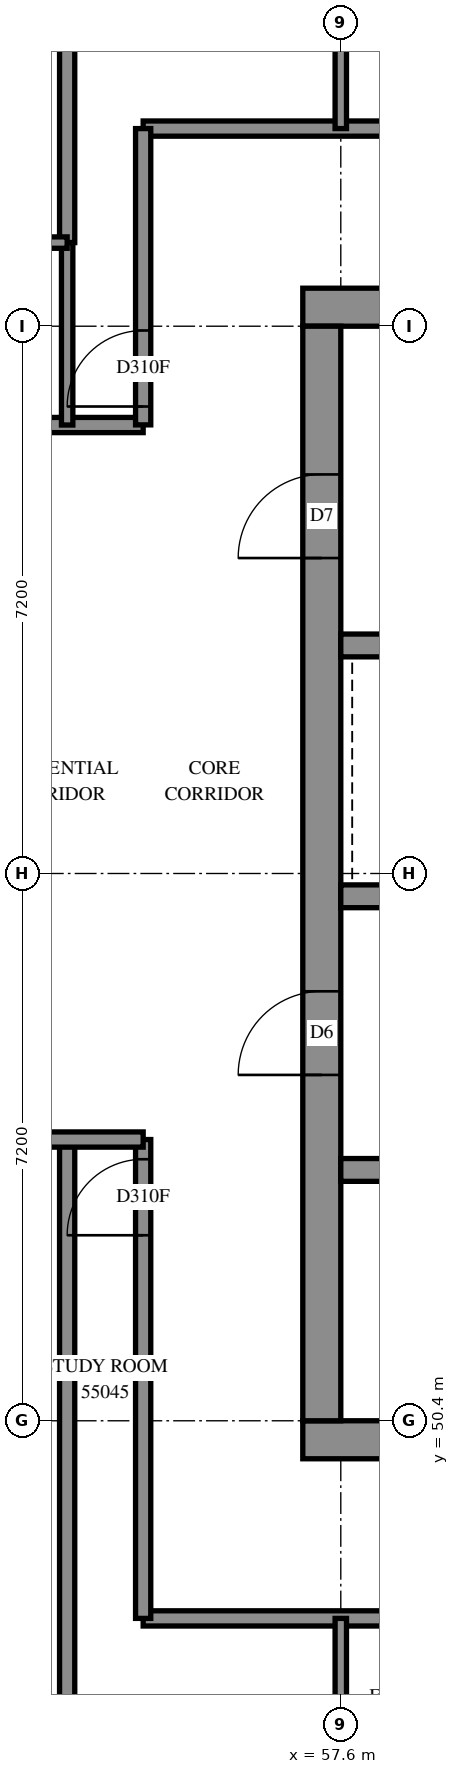
"""IFC4 building model, lengths in metres.
Left out: names, types, materials, properties, quantities, classifications, styles, units other than length and angle.
Written with IfcOpenShell. Run it as: python <this file> out.ifc"""

import sys

from ifc_helpers import new_model, si_unit, direction, frame, frame_2d, origin, place, context, subcontext, project, spatial, rectangle, extrude, element, fill, save


model = new_model("IFC4")
c1 = context("Model", 3, precision=1e-05, world=origin(), true_north=direction((0.0, 1.0)))
c2 = subcontext(c1, "Body", "Model", "MODEL_VIEW")
j1 = project(units=[si_unit("LENGTHUNIT", "METRE"), si_unit("PLANEANGLEUNIT", "RADIAN")], contexts=[c1])
p1 = place(None, origin())
s1 = spatial("IfcSite", under=j1, at=p1, CompositionType="ELEMENT")
p2 = place(p1, origin())
s2 = spatial("IfcBuilding", under=s1, at=p2, CompositionType="ELEMENT")
p3 = place(p2, frame((0.0, 0.0, 203.2)))
s3 = spatial("IfcBuildingStorey", under=s2, at=p3, CompositionType="ELEMENT", Elevation=203.2)
p4 = place(p3, frame((57.1, 50.15, -0.3), z_axis=(0.0, 0.0, 1.0), x_axis=(1.0, 0.0, 0.0)))
e1 = element("IfcWall", 1, at=p4, inside=s3, PredefinedType="SHEAR", context=c2, shape_type="SweptSolid", body=[
    extrude(rectangle(XDim=15.4, YDim=0.5, at=frame_2d((7.7, 0.0))), origin(), (0.0, 0.0, 1.0), 2.7),
])
p5 = place(p3, frame((57.1, 65.05, -0.3), z_axis=(0.0, 0.0, 1.0), x_axis=(1.0, 0.0, 0.0)))
e2 = element("IfcWall", 2, at=p5, inside=s3, PredefinedType="SHEAR", context=c2, shape_type="SweptSolid", body=[
    extrude(rectangle(XDim=15.4, YDim=0.5, at=frame_2d((7.7, 0.0))), origin(), (0.0, 0.0, 1.0), 2.7),
])
p6 = place(p5, frame((10.5, 0.0, 0.3)))
e3 = element("IfcOpeningElement", 3, at=p6, cuts=e2, PredefinedType="OPENING", context=c2, shape_type="SweptSolid", body=[
    extrude(rectangle(XDim=0.8, YDim=2.1, at=frame_2d((0.4, 1.05))), frame((0.0, 0.26, 0.0), z_axis=(0.0, -1.0, 0.0), x_axis=(1.0, 0.0, 0.0)), (0.0, 0.0, 1.0), 0.52),
])
p7 = place(p3, frame((57.35, 50.4, -0.3), z_axis=(0.0, 0.0, 1.0), x_axis=(0.0, 1.0, 0.0)))
e4 = element("IfcWall", 4, at=p7, inside=s3, PredefinedType="SHEAR", context=c2, shape_type="SweptSolid", body=[
    extrude(rectangle(XDim=14.4, YDim=0.5, at=frame_2d((7.2, 0.0))), origin(), (0.0, 0.0, 1.0), 2.7),
])
p8 = place(p7, frame((4.55, 0.0, 0.3)))
e5 = element("IfcOpeningElement", 5, at=p8, cuts=e4, PredefinedType="OPENING", context=c2, shape_type="SweptSolid", body=[
    extrude(rectangle(XDim=1.1, YDim=2.1, at=frame_2d((0.55, 1.05))), frame((0.0, 0.26, 0.0), z_axis=(0.0, -1.0, 0.0), x_axis=(1.0, 0.0, 0.0)), (0.0, 0.0, 1.0), 0.52),
])
p9 = place(p7, frame((11.35, 0.0, 0.3)))
e6 = element("IfcOpeningElement", 6, at=p9, cuts=e4, PredefinedType="OPENING", context=c2, shape_type="SweptSolid", body=[
    extrude(rectangle(XDim=1.1, YDim=2.1, at=frame_2d((0.55, 1.05))), frame((0.0, 0.26, 0.0), z_axis=(0.0, -1.0, 0.0), x_axis=(1.0, 0.0, 0.0)), (0.0, 0.0, 1.0), 0.52),
])
p10 = place(p3, frame((57.6, 53.7, 0.0), z_axis=(0.0, 0.0, 1.0), x_axis=(1.0, 0.0, 0.0)))
e7 = element("IfcWall", 7, at=p10, inside=s3, PredefinedType="SOLIDWALL", context=c2, shape_type="SweptSolid", body=[
    extrude(rectangle(XDim=14.4, YDim=0.3, at=frame_2d((7.2, 0.0))), origin(), (0.0, 0.0, 1.0), 3.1),
])
p11 = place(p10, frame((1.35, 0.0, 0.0)))
e8 = element("IfcOpeningElement", 8, at=p11, cuts=e7, PredefinedType="OPENING", context=c2, shape_type="SweptSolid", body=[
    extrude(rectangle(XDim=0.9, YDim=2.1, at=frame_2d((0.45, 1.05))), frame((0.0, 0.16, 0.0), z_axis=(0.0, -1.0, 0.0), x_axis=(1.0, 0.0, 0.0)), (0.0, 0.0, 1.0), 0.32),
])
p12 = place(p10, frame((4.95, 0.0, 0.0)))
e9 = element("IfcOpeningElement", 9, at=p12, cuts=e7, PredefinedType="OPENING", context=c2, shape_type="SweptSolid", body=[
    extrude(rectangle(XDim=0.9, YDim=2.1, at=frame_2d((0.45, 1.05))), frame((0.0, 0.16, 0.0), z_axis=(0.0, -1.0, 0.0), x_axis=(1.0, 0.0, 0.0)), (0.0, 0.0, 1.0), 0.32),
])
p13 = place(p10, frame((8.55, 0.0, 0.0)))
e10 = element("IfcOpeningElement", 10, at=p13, cuts=e7, PredefinedType="OPENING", context=c2, shape_type="SweptSolid", body=[
    extrude(rectangle(XDim=0.9, YDim=2.1, at=frame_2d((0.45, 1.05))), frame((0.0, 0.16, 0.0), z_axis=(0.0, -1.0, 0.0), x_axis=(1.0, 0.0, 0.0)), (0.0, 0.0, 1.0), 0.32),
])
p14 = place(p10, frame((12.05, 0.0, 0.0)))
e11 = element("IfcOpeningElement", 11, at=p14, cuts=e7, PredefinedType="OPENING", context=c2, shape_type="SweptSolid", body=[
    extrude(rectangle(XDim=1.1, YDim=2.1, at=frame_2d((0.55, 1.05))), frame((0.0, 0.16, 0.0), z_axis=(0.0, -1.0, 0.0), x_axis=(1.0, 0.0, 0.0)), (0.0, 0.0, 1.0), 0.32),
])
p15 = place(p3, frame((57.6, 57.3, 0.0), z_axis=(0.0, 0.0, 1.0), x_axis=(1.0, 0.0, 0.0)))
e12 = element("IfcWall", 12, at=p15, inside=s3, PredefinedType="SOLIDWALL", context=c2, shape_type="SweptSolid", body=[
    extrude(rectangle(XDim=14.4, YDim=0.3, at=frame_2d((7.2, 0.0))), origin(), (0.0, 0.0, 1.0), 3.1),
])
p16 = place(p15, frame((1.25, 0.0, 0.0)))
e13 = element("IfcOpeningElement", 13, at=p16, cuts=e12, PredefinedType="OPENING", context=c2, shape_type="SweptSolid", body=[
    extrude(rectangle(XDim=1.1, YDim=2.1, at=frame_2d((0.55, 1.05))), frame((0.0, 0.16, 0.0), z_axis=(0.0, -1.0, 0.0), x_axis=(1.0, 0.0, 0.0)), (0.0, 0.0, 1.0), 0.32),
])
p17 = place(p15, frame((4.85, 0.0, 0.0)))
e14 = element("IfcOpeningElement", 14, at=p17, cuts=e12, PredefinedType="OPENING", context=c2, shape_type="SweptSolid", body=[
    extrude(rectangle(XDim=1.1, YDim=2.1, at=frame_2d((0.55, 1.05))), frame((0.0, 0.16, 0.0), z_axis=(0.0, -1.0, 0.0), x_axis=(1.0, 0.0, 0.0)), (0.0, 0.0, 1.0), 0.32),
])
p18 = place(p15, frame((8.45, 0.0, 0.0)))
e15 = element("IfcOpeningElement", 15, at=p18, cuts=e12, PredefinedType="OPENING", context=c2, shape_type="SweptSolid", body=[
    extrude(rectangle(XDim=1.1, YDim=2.1, at=frame_2d((0.55, 1.05))), frame((0.0, 0.16, 0.0), z_axis=(0.0, -1.0, 0.0), x_axis=(1.0, 0.0, 0.0)), (0.0, 0.0, 1.0), 0.32),
])
p19 = place(p15, frame((12.05, 0.0, 0.0)))
e16 = element("IfcOpeningElement", 16, at=p19, cuts=e12, PredefinedType="OPENING", context=c2, shape_type="SweptSolid", body=[
    extrude(rectangle(XDim=1.1, YDim=2.1, at=frame_2d((0.55, 1.05))), frame((0.0, 0.16, 0.0), z_axis=(0.0, -1.0, 0.0), x_axis=(1.0, 0.0, 0.0)), (0.0, 0.0, 1.0), 0.32),
])
p20 = place(p3, frame((57.6, 60.6, 0.0), z_axis=(0.0, 0.0, 1.0), x_axis=(1.0, 0.0, 0.0)))
e17 = element("IfcWall", 17, at=p20, inside=s3, PredefinedType="SOLIDWALL", context=c2, shape_type="SweptSolid", body=[
    extrude(rectangle(XDim=7.2, YDim=0.3, at=frame_2d((3.6, 0.0))), origin(), (0.0, 0.0, 1.0), 3.1),
])
p21 = place(p3, frame((55.0, 67.4, 0.0), z_axis=(0.0, 0.0, 1.0), x_axis=(1.0, 0.0, 0.0)))
e18 = element("IfcWall", 18, at=p21, inside=s3, PredefinedType="PARTITIONING", context=c2, shape_type="SweptSolid", body=[
    extrude(rectangle(XDim=19.6, YDim=0.2, at=frame_2d((9.8, 0.0))), origin(), (0.0, 0.0, 1.0), 3.1),
])
p22 = place(p21, frame((6.499, 0.0, 0.0)))
e19 = element("IfcOpeningElement", 19, at=p22, cuts=e18, PredefinedType="OPENING", context=c2, shape_type="SweptSolid", body=[
    extrude(rectangle(XDim=0.9, YDim=2.1, at=frame_2d((0.45, 1.05))), frame((0.0, 0.11, 0.0), z_axis=(0.0, -1.0, 0.0), x_axis=(1.0, 0.0, 0.0)), (0.0, 0.0, 1.0), 0.22),
])
p23 = place(p21, frame((14.001, 0.0, 0.0)))
e20 = element("IfcOpeningElement", 20, at=p23, cuts=e18, PredefinedType="OPENING", context=c2, shape_type="SweptSolid", body=[
    extrude(rectangle(XDim=0.9, YDim=2.1, at=frame_2d((0.45, 1.05))), frame((0.0, 0.11, 0.0), z_axis=(0.0, -1.0, 0.0), x_axis=(1.0, 0.0, 0.0)), (0.0, 0.0, 1.0), 0.22),
])
p24 = place(p3, frame((55.0, 47.8, 0.0), z_axis=(0.0, 0.0, 1.0), x_axis=(1.0, 0.0, 0.0)))
e21 = element("IfcWall", 21, at=p24, inside=s3, PredefinedType="PARTITIONING", context=c2, shape_type="SweptSolid", body=[
    extrude(rectangle(XDim=19.266, YDim=0.2, at=frame_2d((9.633, 0.0))), origin(), (0.0, 0.0, 1.0), 3.1),
])
p25 = place(p24, frame((4.9, 0.0, 0.0)))
e22 = element("IfcOpeningElement", 22, at=p25, cuts=e21, PredefinedType="OPENING", context=c2, shape_type="SweptSolid", body=[
    extrude(rectangle(XDim=0.9, YDim=2.1, at=frame_2d((0.45, 1.05))), frame((0.0, 0.11, 0.0), z_axis=(0.0, -1.0, 0.0), x_axis=(1.0, 0.0, 0.0)), (0.0, 0.0, 1.0), 0.22),
])
p26 = place(p24, frame((6.6, 0.0, 0.0)))
e23 = element("IfcOpeningElement", 23, at=p26, cuts=e21, PredefinedType="OPENING", context=c2, shape_type="SweptSolid", body=[
    extrude(rectangle(XDim=0.9, YDim=2.1, at=frame_2d((0.45, 1.05))), frame((0.0, 0.11, 0.0), z_axis=(0.0, -1.0, 0.0), x_axis=(1.0, 0.0, 0.0)), (0.0, 0.0, 1.0), 0.22),
])
p27 = place(p24, frame((13.743, 0.0, 0.0)))
e24 = element("IfcOpeningElement", 24, at=p27, cuts=e21, PredefinedType="OPENING", context=c2, shape_type="SweptSolid", body=[
    extrude(rectangle(XDim=0.9, YDim=2.1, at=frame_2d((0.45, 1.05))), frame((0.0, 0.11, 0.0), z_axis=(0.0, -1.0, 0.0), x_axis=(1.0, 0.0, 0.0)), (0.0, 0.0, 1.0), 0.22),
])
p28 = place(p3, frame((40.702, 63.5, 0.0), z_axis=(0.0, 0.0, 1.0), x_axis=(1.0, 0.0, 0.0)))
e25 = element("IfcWall", 25, at=p28, inside=s3, PredefinedType="PARTITIONING", context=c2, shape_type="SweptSolid", body=[
    extrude(rectangle(XDim=14.298, YDim=0.2, at=frame_2d((7.149, 0.0))), origin(), (0.0, 0.0, 1.0), 3.1),
])
p29 = place(p28, frame((6.332, 0.0, 0.0)))
e26 = element("IfcOpeningElement", 26, at=p29, cuts=e25, PredefinedType="OPENING", context=c2, shape_type="SweptSolid", body=[
    extrude(rectangle(XDim=0.9, YDim=2.1, at=frame_2d((0.45, 1.05))), frame((0.0, 0.11, 0.0), z_axis=(0.0, -1.0, 0.0), x_axis=(1.0, 0.0, 0.0)), (0.0, 0.0, 1.0), 0.22),
])
p30 = place(p28, frame((10.098, 0.0, 0.0)))
e27 = element("IfcOpeningElement", 27, at=p30, cuts=e25, PredefinedType="OPENING", context=c2, shape_type="SweptSolid", body=[
    extrude(rectangle(XDim=0.9, YDim=2.1, at=frame_2d((0.45, 1.05))), frame((0.0, 0.11, 0.0), z_axis=(0.0, -1.0, 0.0), x_axis=(1.0, 0.0, 0.0)), (0.0, 0.0, 1.0), 0.22),
])
p31 = place(p3, frame((54.0, 42.363, 0.0), z_axis=(0.0, 0.0, 1.0), x_axis=(0.0, 1.0, 0.0)))
e28 = element("IfcWall", 28, at=p31, inside=s3, PredefinedType="PARTITIONING", context=c2, shape_type="SweptSolid", body=[
    extrude(rectangle(XDim=11.737, YDim=0.2, at=frame_2d((5.869, 0.0))), origin(), (0.0, 0.0, 1.0), 3.1),
])
p32 = place(p3, frame((54.0, 65.9, 0.0), z_axis=(0.0, 0.0, 1.0), x_axis=(0.0, 1.0, 0.0)))
e29 = element("IfcWall", 29, at=p32, inside=s3, PredefinedType="PARTITIONING", context=c2, shape_type="SweptSolid", body=[
    extrude(rectangle(XDim=6.847, YDim=0.2, at=frame_2d((3.424, 0.0))), origin(), (0.0, 0.0, 1.0), 3.1),
])
p33 = place(p3, frame((55.0, 47.8, 0.0), z_axis=(0.0, 0.0, 1.0), x_axis=(0.0, 1.0, 0.0)))
e30 = element("IfcWall", 30, at=p33, inside=s3, PredefinedType="PARTITIONING", context=c2, shape_type="SweptSolid", body=[
    extrude(rectangle(XDim=6.3, YDim=0.2, at=frame_2d((3.15, 0.0))), origin(), (0.0, 0.0, 1.0), 3.1),
])
p34 = place(p33, frame((5.041, 0.0, 0.0)))
e31 = element("IfcOpeningElement", 31, at=p34, cuts=e30, PredefinedType="OPENING", context=c2, shape_type="SweptSolid", body=[
    extrude(rectangle(XDim=1.0, YDim=2.1, at=frame_2d((0.5, 1.05))), frame((0.0, 0.11, 0.0), z_axis=(0.0, -1.0, 0.0), x_axis=(1.0, 0.0, 0.0)), (0.0, 0.0, 1.0), 0.22),
])
p35 = place(p3, frame((50.4, 54.1, 0.0), z_axis=(0.0, 0.0, 1.0), x_axis=(1.0, 0.0, 0.0)))
e32 = element("IfcWall", 32, at=p35, inside=s3, PredefinedType="PARTITIONING", context=c2, shape_type="SweptSolid", body=[
    extrude(rectangle(XDim=4.6, YDim=0.2, at=frame_2d((2.3, 0.0))), origin(), (0.0, 0.0, 1.0), 3.1),
])
p36 = place(p35, frame((2.3, 0.0, 0.0)))
e33 = element("IfcOpeningElement", 33, at=p36, cuts=e32, PredefinedType="OPENING", context=c2, shape_type="SweptSolid", body=[
    extrude(rectangle(XDim=0.9, YDim=2.1, at=frame_2d((0.45, 1.05))), frame((0.0, 0.11, 0.0), z_axis=(0.0, -1.0, 0.0), x_axis=(1.0, 0.0, 0.0)), (0.0, 0.0, 1.0), 0.22),
])
p37 = place(p3, frame((55.0, 63.502, 0.0), z_axis=(0.0, 0.0, 1.0), x_axis=(0.0, 1.0, 0.0)))
e34 = element("IfcWall", 34, at=p37, inside=s3, PredefinedType="PARTITIONING", context=c2, shape_type="SweptSolid", body=[
    extrude(rectangle(XDim=3.898, YDim=0.2, at=frame_2d((1.949, 0.0))), origin(), (0.0, 0.0, 1.0), 3.1),
])
p38 = place(p37, frame((0.242, 0.0, 0.0)))
e35 = element("IfcOpeningElement", 35, at=p38, cuts=e34, PredefinedType="OPENING", context=c2, shape_type="SweptSolid", body=[
    extrude(rectangle(XDim=1.0, YDim=2.1, at=frame_2d((0.5, 1.05))), frame((0.0, 0.11, 0.0), z_axis=(0.0, -1.0, 0.0), x_axis=(1.0, 0.0, 0.0)), (0.0, 0.0, 1.0), 0.22),
])
for number, where, z_axis, x_axis in (
    (36, (54.0, 63.5, 0.0), (0.0, 0.0, 1.0), (0.0, 1.0, 0.0)),
    (37, (57.6, 45.4, 0.0), (0.0, 0.0, 1.0), (0.0, 1.0, 0.0)),
    (38, (57.6, 67.4, 0.0), (0.0, 0.0, 1.0), (0.0, 1.0, 0.0)),
):
    element("IfcWall", number, at=place(p3, frame(where, z_axis=z_axis, x_axis=x_axis)), inside=s3, PredefinedType="PARTITIONING", context=c2, shape_type="SweptSolid", body=[
        extrude(rectangle(XDim=2.4, YDim=0.15, at=frame_2d((1.2, 0.0))), origin(), (0.0, 0.0, 1.0), 3.1),
    ])
p39 = place(p3, frame((52.1, 65.9, 0.0), z_axis=(0.0, 0.0, 1.0), x_axis=(1.0, 0.0, 0.0)))
e39 = element("IfcWall", 39, at=p39, inside=s3, PredefinedType="PARTITIONING", context=c2, shape_type="SweptSolid", body=[
    extrude(rectangle(XDim=1.9, YDim=0.15, at=frame_2d((0.95, 0.0))), origin(), (0.0, 0.0, 1.0), 3.1),
])
p40 = place(p39, frame((0.493, 0.0, 0.0)))
e40 = element("IfcOpeningElement", 40, at=p40, cuts=e39, PredefinedType="OPENING", context=c2, shape_type="SweptSolid", body=[
    extrude(rectangle(XDim=0.8, YDim=2.1, at=frame_2d((0.4, 1.05))), frame((0.0, 0.085, 0.0), z_axis=(0.0, -1.0, 0.0), x_axis=(1.0, 0.0, 0.0)), (0.0, 0.0, 1.0), 0.17),
])
p41 = place(p8, origin())
e41 = element("IfcDoor", 41, at=p41, inside=s3, OperationType="DOUBLE_DOOR_SINGLE_SWING", PredefinedType="DOOR", context=c2, shape_type="SweptSolid", body=[
    extrude(rectangle(XDim=1.1, YDim=2.1, at=frame_2d((0.55, 1.05))), frame((0.0, 0.025, 0.0), z_axis=(0.0, -1.0, 0.0), x_axis=(1.0, 0.0, 0.0)), (0.0, 0.0, 1.0), 0.05),
])
fill(e5, e41)
p42 = place(p9, origin())
e42 = element("IfcDoor", 42, at=p42, inside=s3, OperationType="SINGLE_SWING_LEFT", PredefinedType="DOOR", context=c2, shape_type="SweptSolid", body=[
    extrude(rectangle(XDim=1.1, YDim=2.1, at=frame_2d((0.55, 1.05))), frame((0.0, 0.025, 0.0), z_axis=(0.0, -1.0, 0.0), x_axis=(1.0, 0.0, 0.0)), (0.0, 0.0, 1.0), 0.05),
])
fill(e6, e42)
p43 = place(p38, origin())
e43 = element("IfcDoor", 43, at=p43, inside=s3, OperationType="SINGLE_SWING_LEFT", PredefinedType="DOOR", context=c2, shape_type="SweptSolid", body=[
    extrude(rectangle(XDim=1.0, YDim=2.1, at=frame_2d((0.5, 1.05))), frame((0.0, 0.025, 0.0), z_axis=(0.0, -1.0, 0.0), x_axis=(1.0, 0.0, 0.0)), (0.0, 0.0, 1.0), 0.05),
])
fill(e35, e43)
p44 = place(p34, origin())
e44 = element("IfcDoor", 44, at=p44, inside=s3, OperationType="SINGLE_SWING_RIGHT", PredefinedType="DOOR", context=c2, shape_type="SweptSolid", body=[
    extrude(rectangle(XDim=1.0, YDim=2.1, at=frame_2d((0.5, 1.05))), frame((0.0, 0.025, 0.0), z_axis=(0.0, -1.0, 0.0), x_axis=(1.0, 0.0, 0.0)), (0.0, 0.0, 1.0), 0.05),
])
fill(e31, e44)
save(model, sys.argv[1])
